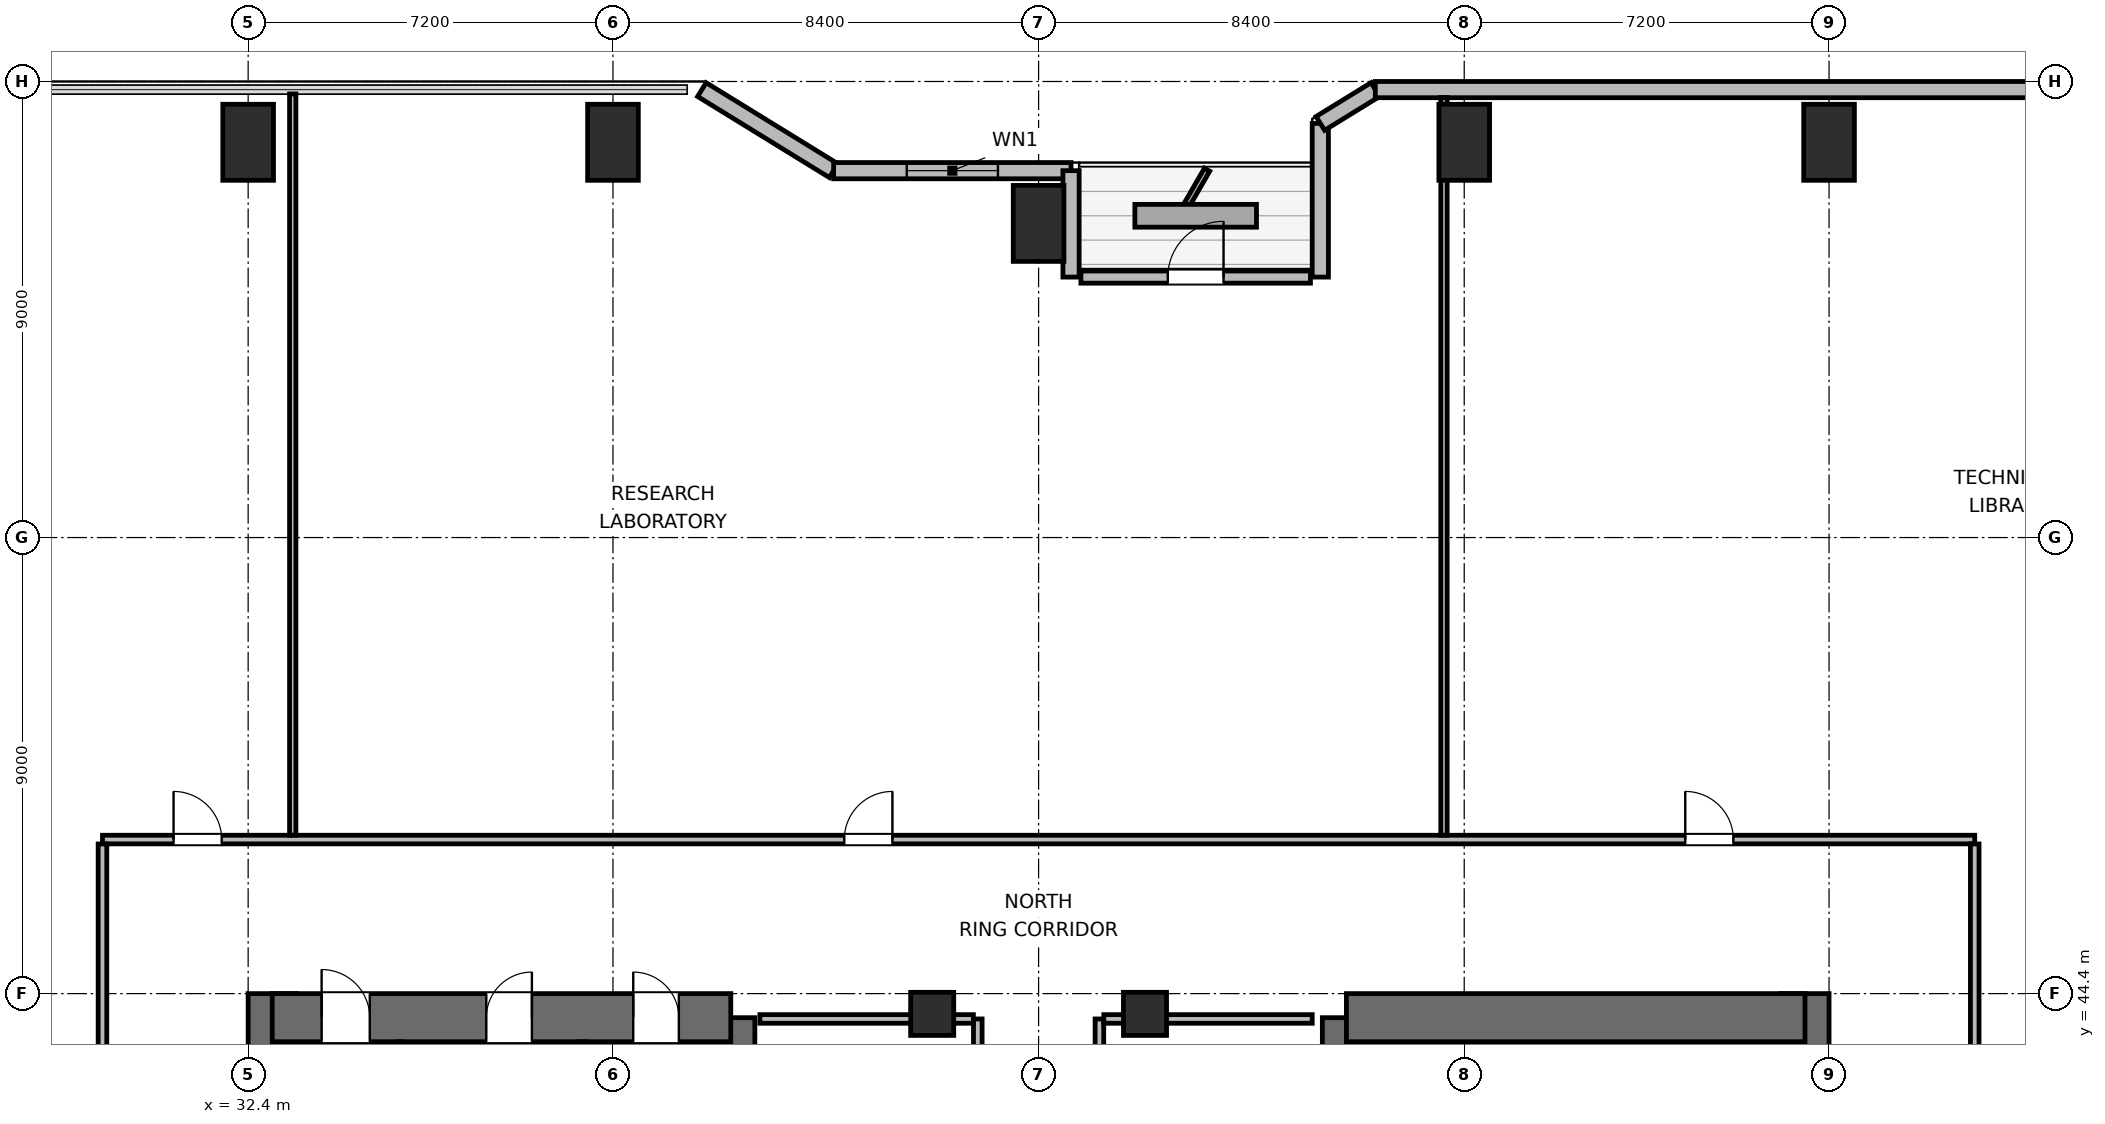
"""IFC4 building model, lengths in metres.
Left out: names, types, materials, properties, quantities, classifications, styles, units other than length and angle.
Written with IfcOpenShell. Run it as: python <this file> out.ifc"""

import sys

from ifc_helpers import new_model, si_unit, direction, frame, frame_2d, origin, origin_2d, place, context, subcontext, project, spatial, rectangle, extrude, element, fill, save


model = new_model("IFC4")
c1 = context("Model", 3, precision=1e-05, world=origin(), true_north=direction((0.0, 1.0)))
c2 = subcontext(c1, "Body", "Model", "MODEL_VIEW")
j1 = project(units=[si_unit("LENGTHUNIT", "METRE"), si_unit("PLANEANGLEUNIT", "RADIAN")], contexts=[c1])
p1 = place(None, origin())
s1 = spatial("IfcSite", under=j1, at=p1, CompositionType="ELEMENT")
p2 = place(p1, origin())
s2 = spatial("IfcBuilding", under=s1, at=p2, CompositionType="ELEMENT")
p3 = place(p2, frame((0.0, 0.0, 76.8)))
s3 = spatial("IfcBuildingStorey", under=s2, at=p3, CompositionType="ELEMENT", Elevation=76.8)
p4 = place(p3, frame((32.875, 27.6, 0.0), z_axis=(0.0, 0.0, 1.0), x_axis=(0.0, 1.0, 0.0)))
e1 = element("IfcWall", 1, at=p4, inside=s3, PredefinedType="SHEAR", context=c2, shape_type="SweptSolid", body=[
    extrude(rectangle(XDim=16.8, YDim=0.95, at=frame_2d((8.4, 0.0))), origin(), (0.0, 0.0, 1.0), 3.9),
])
p5 = place(p3, frame((41.925, 37.8, 0.0), z_axis=(0.0, 0.0, 1.0), x_axis=(0.0, 1.0, 0.0)))
e2 = element("IfcWall", 2, at=p5, inside=s3, PredefinedType="SHEAR", context=c2, shape_type="SweptSolid", body=[
    extrude(rectangle(XDim=6.125, YDim=0.95, at=frame_2d((3.062, 0.0))), origin(), (0.0, 0.0, 1.0), 3.9),
])
p6 = place(p3, frame((32.875, 43.925, 0.0), z_axis=(0.0, 0.0, 1.0), x_axis=(1.0, 0.0, 0.0)))
e3 = element("IfcWall", 3, at=p6, inside=s3, PredefinedType="SHEAR", context=c2, shape_type="SweptSolid", body=[
    extrude(rectangle(XDim=9.05, YDim=0.95, at=frame_2d((4.525, 0.0))), origin(), (0.0, 0.0, 1.0), 3.9),
])
p7 = place(p6, frame((0.975, 0.0, 0.0)))
e4 = element("IfcOpeningElement", 4, at=p7, cuts=e3, PredefinedType="OPENING", context=c2, shape_type="SweptSolid", body=[
    extrude(rectangle(XDim=0.95, YDim=2.04, at=frame_2d((0.475, 1.02))), frame((0.0, 0.485, 0.0), z_axis=(0.0, -1.0, 0.0), x_axis=(1.0, 0.0, 0.0)), (0.0, 0.0, 1.0), 0.97),
])
p8 = place(p6, frame((4.225, 0.0, 0.0)))
e5 = element("IfcOpeningElement", 5, at=p8, cuts=e3, PredefinedType="OPENING", context=c2, shape_type="SweptSolid", body=[
    extrude(rectangle(XDim=0.9, YDim=2.02, at=frame_2d((0.45, 1.01))), frame((0.0, 0.485, 0.0), z_axis=(0.0, -1.0, 0.0), x_axis=(1.0, 0.0, 0.0)), (0.0, 0.0, 1.0), 0.97),
])
p9 = place(p6, frame((7.125, 0.0, 0.0)))
e6 = element("IfcOpeningElement", 6, at=p9, cuts=e3, PredefinedType="OPENING", context=c2, shape_type="SweptSolid", body=[
    extrude(rectangle(XDim=0.9, YDim=2.02, at=frame_2d((0.45, 1.01))), frame((0.0, 0.485, 0.0), z_axis=(0.0, -1.0, 0.0), x_axis=(1.0, 0.0, 0.0)), (0.0, 0.0, 1.0), 0.97),
])
p10 = place(p3, frame((54.075, 38.0, 0.0), z_axis=(0.0, 0.0, 1.0), x_axis=(0.0, 1.0, 0.0)))
e7 = element("IfcWall", 7, at=p10, inside=s3, PredefinedType="SHEAR", context=c2, shape_type="SweptSolid", body=[
    extrude(rectangle(XDim=5.925, YDim=0.95, at=frame_2d((2.962, 0.0))), origin(), (0.0, 0.0, 1.0), 3.9),
])
p11 = place(p3, frame((63.125, 27.6, 0.0), z_axis=(0.0, 0.0, 1.0), x_axis=(0.0, 1.0, 0.0)))
e8 = element("IfcWall", 8, at=p11, inside=s3, PredefinedType="SHEAR", context=c2, shape_type="SweptSolid", body=[
    extrude(rectangle(XDim=16.8, YDim=0.95, at=frame_2d((8.4, 0.0))), origin(), (0.0, 0.0, 1.0), 3.9),
])
p12 = place(p3, frame((54.075, 43.925, 0.0), z_axis=(0.0, 0.0, 1.0), x_axis=(1.0, 0.0, 0.0)))
e9 = element("IfcWall", 9, at=p12, inside=s3, PredefinedType="SHEAR", context=c2, shape_type="SweptSolid", body=[
    extrude(rectangle(XDim=9.05, YDim=0.95, at=frame_2d((4.525, 0.0))), origin(), (0.0, 0.0, 1.0), 3.9),
])
for number, where, z_axis, x_axis in (
    (10, (32.4, 61.2, 0.0), (0.0, 0.0, 1.0), (1.0, 0.0, 0.0)),
    (11, (39.6, 61.2, 0.0), (0.0, 0.0, 1.0), (1.0, 0.0, 0.0)),
    (12, (48.0, 59.6, 0.0), (0.0, 0.0, 1.0), (1.0, 0.0, 0.0)),
    (13, (56.4, 61.2, 0.0), (0.0, 0.0, 1.0), (1.0, 0.0, 0.0)),
    (14, (63.6, 61.2, 0.0), (0.0, 0.0, 1.0), (1.0, 0.0, 0.0)),
):
    element("IfcColumn", number, at=place(p3, frame(where, z_axis=z_axis, x_axis=x_axis)), inside=s3, PredefinedType="COLUMN", context=c2, shape_type="SweptSolid", body=[
        extrude(rectangle(XDim=1.0, YDim=1.5, at=origin_2d()), origin(), (0.0, 0.0, 1.0), 3.9),
    ])
for number, where, z_axis, x_axis in (
    (15, (45.9, 44.0, 0.0), (0.0, 0.0, 1.0), (1.0, 0.0, 0.0)),
    (16, (50.1, 44.0, 0.0), (0.0, 0.0, 1.0), (1.0, 0.0, 0.0)),
):
    element("IfcColumn", number, at=place(p3, frame(where, z_axis=z_axis, x_axis=x_axis)), inside=s3, PredefinedType="COLUMN", context=c2, shape_type="SweptSolid", body=[
        extrude(rectangle(XDim=0.85, YDim=0.85, at=origin_2d()), origin(), (0.0, 0.0, 1.0), 3.9),
    ])
p13 = place(p3, frame((41.355, 62.24, 0.0), z_axis=(0.0, 0.0, 1.0), x_axis=(0.851630857047, -0.524142044989, 0.0)))
e17 = element("IfcWall", 17, at=p13, inside=s3, PredefinedType="SOLIDWALL", context=c2, shape_type="SweptSolid", body=[
    extrude(rectangle(XDim=3.053, YDim=0.32, at=frame_2d((1.526, 0.0))), origin(), (0.0, 0.0, 1.0), 2.185),
])
p14 = place(p3, frame((43.955, 60.64, 0.0), z_axis=(0.0, 0.0, 1.0), x_axis=(1.0, 0.0, 0.0)))
e18 = element("IfcWall", 18, at=p14, inside=s3, PredefinedType="SOLIDWALL", context=c2, shape_type="SweptSolid", body=[
    extrude(rectangle(XDim=4.685, YDim=0.32, at=frame_2d((2.343, 0.0))), origin(), (0.0, 0.0, 1.0), 2.185),
])
p15 = place(p14, frame((1.443, 0.0, 0.85)))
e19 = element("IfcOpeningElement", 19, at=p15, cuts=e18, PredefinedType="OPENING", context=c2, shape_type="SweptSolid", body=[
    extrude(rectangle(XDim=1.8, YDim=1.1, at=frame_2d((0.9, 0.55))), frame((0.0, 0.17, 0.0), z_axis=(0.0, -1.0, 0.0), x_axis=(1.0, 0.0, 0.0)), (0.0, 0.0, 1.0), 0.34),
])
p16 = place(p3, frame((48.64, 60.64, 0.0), z_axis=(0.0, 0.0, 1.0), x_axis=(0.0, -1.0, 0.0)))
e20 = element("IfcWall", 20, at=p16, inside=s3, PredefinedType="SOLIDWALL", context=c2, shape_type="SweptSolid", body=[
    extrude(rectangle(XDim=2.1, YDim=0.32, at=frame_2d((1.05, 0.0))), origin(), (0.0, 0.0, 1.0), 2.185),
])
p17 = place(p3, frame((48.835, 58.54, 0.0), z_axis=(0.0, 0.0, 1.0), x_axis=(1.0, 0.0, 0.0)))
e21 = element("IfcWall", 21, at=p17, inside=s3, PredefinedType="SOLIDWALL", context=c2, shape_type="SweptSolid", body=[
    extrude(rectangle(XDim=4.53, YDim=0.24, at=frame_2d((2.265, 0.0))), origin(), (0.0, 0.0, 1.0), 2.185),
])
p18 = place(p17, frame((1.715, 0.0, 0.0)))
e22 = element("IfcOpeningElement", 22, at=p18, cuts=e21, PredefinedType="OPENING", context=c2, shape_type="SweptSolid", body=[
    extrude(rectangle(XDim=1.1, YDim=2.04, at=frame_2d((0.55, 1.02))), frame((0.0, 0.13, 0.0), z_axis=(0.0, -1.0, 0.0), x_axis=(1.0, 0.0, 0.0)), (0.0, 0.0, 1.0), 0.26),
])
p19 = place(p3, frame((53.56, 58.54, 0.0), z_axis=(0.0, 0.0, 1.0), x_axis=(0.0, 1.0, 0.0)))
e23 = element("IfcWall", 23, at=p19, inside=s3, PredefinedType="SOLIDWALL", context=c2, shape_type="SweptSolid", body=[
    extrude(rectangle(XDim=3.032, YDim=0.32, at=frame_2d((1.516, 0.0))), origin(), (0.0, 0.0, 1.0), 2.185),
])
p20 = place(p3, frame((53.56, 61.573, 0.0), z_axis=(0.0, 0.0, 1.0), x_axis=(0.851776724646, 0.523904964045, 0.0)))
e24 = element("IfcWall", 24, at=p20, inside=s3, PredefinedType="SOLIDWALL", context=c2, shape_type="SweptSolid", body=[
    extrude(rectangle(XDim=1.274, YDim=0.32, at=frame_2d((0.637, 0.0))), origin(), (0.0, 0.0, 1.0), 3.6),
])
p21 = place(p3, frame((54.645, 62.24, 0.0), z_axis=(0.0, 0.0, 1.0), x_axis=(1.0, 0.0, 0.0)))
e25 = element("IfcWall", 25, at=p21, inside=s3, PredefinedType="SOLIDWALL", context=c2, shape_type="SweptSolid", body=[
    extrude(rectangle(XDim=19.134, YDim=0.32, at=frame_2d((9.567, 0.0))), origin(), (0.0, 0.0, 1.0), 3.6),
])
for number, where, z_axis, x_axis in (
    (26, (35.4, 41.095, 0.0), (0.0, 0.0, 1.0), (0.0, 1.0, 0.0)),
    (27, (39.0, 41.095, 0.0), (0.0, 0.0, 1.0), (0.0, 1.0, 0.0)),
):
    element("IfcWall", number, at=place(p3, frame(where, z_axis=z_axis, x_axis=x_axis)), inside=s3, PredefinedType="PARTITIONING", context=c2, shape_type="SweptSolid", body=[
        extrude(rectangle(XDim=2.355, YDim=0.125, at=frame_2d((1.177, 0.0))), origin(), (0.0, 0.0, 1.0), 3.6),
    ])
p22 = place(p3, frame((46.8, 37.9, 0.0), z_axis=(0.0, 0.0, 1.0), x_axis=(0.0, 1.0, 0.0)))
e28 = element("IfcWall", 28, at=p22, inside=s3, PredefinedType="PARTITIONING", context=c2, shape_type="SweptSolid", body=[
    extrude(rectangle(XDim=6.0, YDim=0.17, at=frame_2d((3.0, 0.0))), origin(), (0.0, 0.0, 1.0), 3.6),
])
p23 = place(p22, frame((2.55, 0.0, 0.0)))
e29 = element("IfcOpeningElement", 29, at=p23, cuts=e28, PredefinedType="OPENING", context=c2, shape_type="SweptSolid", body=[
    extrude(rectangle(XDim=0.9, YDim=2.02, at=frame_2d((0.45, 1.01))), frame((0.0, 0.095, 0.0), z_axis=(0.0, -1.0, 0.0), x_axis=(1.0, 0.0, 0.0)), (0.0, 0.0, 1.0), 0.19),
])
p24 = place(p3, frame((42.5, 43.9, 0.0), z_axis=(0.0, 0.0, 1.0), x_axis=(1.0, 0.0, 0.0)))
e30 = element("IfcWall", 30, at=p24, inside=s3, PredefinedType="PARTITIONING", context=c2, shape_type="SweptSolid", body=[
    extrude(rectangle(XDim=4.213, YDim=0.17, at=frame_2d((2.106, 0.0))), origin(), (0.0, 0.0, 1.0), 2.485),
])
p25 = place(p3, frame((49.2, 37.9, 0.0), z_axis=(0.0, 0.0, 1.0), x_axis=(0.0, 1.0, 0.0)))
e31 = element("IfcWall", 31, at=p25, inside=s3, PredefinedType="PARTITIONING", context=c2, shape_type="SweptSolid", body=[
    extrude(rectangle(XDim=6.0, YDim=0.17, at=frame_2d((3.0, 0.0))), origin(), (0.0, 0.0, 1.0), 3.6),
])
p26 = place(p25, frame((1.47, 0.0, 0.0)))
e32 = element("IfcOpeningElement", 32, at=p26, cuts=e31, PredefinedType="OPENING", context=c2, shape_type="SweptSolid", body=[
    extrude(rectangle(XDim=0.9, YDim=2.02, at=frame_2d((0.45, 1.01))), frame((0.0, 0.095, 0.0), z_axis=(0.0, -1.0, 0.0), x_axis=(1.0, 0.0, 0.0)), (0.0, 0.0, 1.0), 0.19),
])
p27 = place(p25, frame((4.47, 0.0, 0.0)))
e33 = element("IfcOpeningElement", 33, at=p27, cuts=e31, PredefinedType="OPENING", context=c2, shape_type="SweptSolid", body=[
    extrude(rectangle(XDim=0.9, YDim=2.02, at=frame_2d((0.45, 1.01))), frame((0.0, 0.095, 0.0), z_axis=(0.0, -1.0, 0.0), x_axis=(1.0, 0.0, 0.0)), (0.0, 0.0, 1.0), 0.19),
])
p28 = place(p3, frame((49.287, 43.9, 0.0), z_axis=(0.0, 0.0, 1.0), x_axis=(1.0, 0.0, 0.0)))
e34 = element("IfcWall", 34, at=p28, inside=s3, PredefinedType="PARTITIONING", context=c2, shape_type="SweptSolid", body=[
    extrude(rectangle(XDim=4.113, YDim=0.17, at=frame_2d((2.056, 0.0))), origin(), (0.0, 0.0, 1.0), 2.485),
])
p29 = place(p3, frame((29.525, 47.44, 0.0), z_axis=(0.0, 0.0, 1.0), x_axis=(1.0, 0.0, 0.0)))
e35 = element("IfcWall", 35, at=p29, inside=s3, PredefinedType="PARTITIONING", context=c2, shape_type="SweptSolid", body=[
    extrude(rectangle(XDim=36.95, YDim=0.17, at=frame_2d((18.475, 0.0))), origin(), (0.0, 0.0, 1.0), 3.6),
])
p30 = place(p29, frame((1.403, 0.0, 0.0)))
e36 = element("IfcOpeningElement", 36, at=p30, cuts=e35, PredefinedType="OPENING", context=c2, shape_type="SweptSolid", body=[
    extrude(rectangle(XDim=0.95, YDim=2.04, at=frame_2d((0.475, 1.02))), frame((0.0, 0.095, 0.0), z_axis=(0.0, -1.0, 0.0), x_axis=(1.0, 0.0, 0.0)), (0.0, 0.0, 1.0), 0.19),
])
p31 = place(p29, frame((14.64, 0.0, 0.0)))
e37 = element("IfcOpeningElement", 37, at=p31, cuts=e35, PredefinedType="OPENING", context=c2, shape_type="SweptSolid", body=[
    extrude(rectangle(XDim=0.95, YDim=2.04, at=frame_2d((0.475, 1.02))), frame((0.0, 0.095, 0.0), z_axis=(0.0, -1.0, 0.0), x_axis=(1.0, 0.0, 0.0)), (0.0, 0.0, 1.0), 0.19),
])
p32 = place(p29, frame((31.237, 0.0, 0.0)))
e38 = element("IfcOpeningElement", 38, at=p32, cuts=e35, PredefinedType="OPENING", context=c2, shape_type="SweptSolid", body=[
    extrude(rectangle(XDim=0.95, YDim=2.04, at=frame_2d((0.475, 1.02))), frame((0.0, 0.095, 0.0), z_axis=(0.0, -1.0, 0.0), x_axis=(1.0, 0.0, 0.0)), (0.0, 0.0, 1.0), 0.19),
])
p33 = place(p3, frame((29.525, 24.647, 0.0), z_axis=(0.0, 0.0, 1.0), x_axis=(0.0, 1.0, 0.0)))
e39 = element("IfcWall", 39, at=p33, inside=s3, PredefinedType="PARTITIONING", context=c2, shape_type="SweptSolid", body=[
    extrude(rectangle(XDim=22.706, YDim=0.17, at=frame_2d((11.353, 0.0))), origin(), (0.0, 0.0, 1.0), 3.6),
])
p34 = place(p33, frame((4.758, 0.0, 0.0)))
e40 = element("IfcOpeningElement", 40, at=p34, cuts=e39, PredefinedType="OPENING", context=c2, shape_type="SweptSolid", body=[
    extrude(rectangle(XDim=0.95, YDim=2.04, at=frame_2d((0.475, 1.02))), frame((0.0, 0.095, 0.0), z_axis=(0.0, -1.0, 0.0), x_axis=(1.0, 0.0, 0.0)), (0.0, 0.0, 1.0), 0.19),
])
p35 = place(p33, frame((16.198, 0.0, 0.0)))
e41 = element("IfcOpeningElement", 41, at=p35, cuts=e39, PredefinedType="OPENING", context=c2, shape_type="SweptSolid", body=[
    extrude(rectangle(XDim=0.95, YDim=2.04, at=frame_2d((0.475, 1.02))), frame((0.0, 0.095, 0.0), z_axis=(0.0, -1.0, 0.0), x_axis=(1.0, 0.0, 0.0)), (0.0, 0.0, 1.0), 0.19),
])
p36 = place(p3, frame((66.475, 24.647, 0.0), z_axis=(0.0, 0.0, 1.0), x_axis=(0.0, 1.0, 0.0)))
e42 = element("IfcWall", 42, at=p36, inside=s3, PredefinedType="PARTITIONING", context=c2, shape_type="SweptSolid", body=[
    extrude(rectangle(XDim=22.706, YDim=0.17, at=frame_2d((11.353, 0.0))), origin(), (0.0, 0.0, 1.0), 3.6),
])
p37 = place(p36, frame((4.658, 0.0, 0.0)))
e43 = element("IfcOpeningElement", 43, at=p37, cuts=e42, PredefinedType="OPENING", context=c2, shape_type="SweptSolid", body=[
    extrude(rectangle(XDim=0.95, YDim=2.04, at=frame_2d((0.475, 1.02))), frame((0.0, 0.095, 0.0), z_axis=(0.0, -1.0, 0.0), x_axis=(1.0, 0.0, 0.0)), (0.0, 0.0, 1.0), 0.19),
])
p38 = place(p36, frame((16.098, 0.0, 0.0)))
e44 = element("IfcOpeningElement", 44, at=p38, cuts=e42, PredefinedType="OPENING", context=c2, shape_type="SweptSolid", body=[
    extrude(rectangle(XDim=0.95, YDim=2.04, at=frame_2d((0.475, 1.02))), frame((0.0, 0.095, 0.0), z_axis=(0.0, -1.0, 0.0), x_axis=(1.0, 0.0, 0.0)), (0.0, 0.0, 1.0), 0.19),
])
p39 = place(p3, frame((33.28, 47.527, 0.0), z_axis=(0.0, 0.0, 1.0), x_axis=(0.0, 1.0, 0.0)))
e45 = element("IfcWall", 45, at=p39, inside=s3, PredefinedType="PARTITIONING", context=c2, shape_type="SweptSolid", body=[
    extrude(rectangle(XDim=14.628, YDim=0.125, at=frame_2d((7.314, 0.0))), origin(), (0.0, 0.0, 1.0), 3.6),
])
p40 = place(p3, frame((56.0, 47.527, 0.0), z_axis=(0.0, 0.0, 1.0), x_axis=(0.0, 1.0, 0.0)))
e46 = element("IfcWall", 46, at=p40, inside=s3, PredefinedType="PARTITIONING", context=c2, shape_type="SweptSolid", body=[
    extrude(rectangle(XDim=14.558, YDim=0.125, at=frame_2d((7.279, 0.0))), origin(), (0.0, 0.0, 1.0), 2.185),
])
p41 = place(p15, origin())
e47 = element("IfcWindow", 47, at=p41, inside=s3, PartitioningType="SINGLE_PANEL", PredefinedType="WINDOW", context=c2, shape_type="SweptSolid", body=[
    extrude(rectangle(XDim=1.8, YDim=1.1, at=frame_2d((0.9, 0.55))), frame((0.0, 0.03, 0.0), z_axis=(0.0, -1.0, 0.0), x_axis=(1.0, 0.0, 0.0)), (0.0, 0.0, 1.0), 0.06),
])
fill(e19, e47)
p42 = place(p18, origin())
e48 = element("IfcDoor", 48, at=p42, inside=s3, OperationType="SINGLE_SWING_RIGHT", PredefinedType="DOOR", context=c2, shape_type="SweptSolid", body=[
    extrude(rectangle(XDim=1.1, YDim=2.04, at=frame_2d((0.55, 1.02))), frame((0.0, 0.025, 0.0), z_axis=(0.0, -1.0, 0.0), x_axis=(1.0, 0.0, 0.0)), (0.0, 0.0, 1.0), 0.05),
])
fill(e22, e48)
p43 = place(p7, origin())
e49 = element("IfcDoor", 49, at=p43, inside=s3, OperationType="SINGLE_SWING_LEFT", PredefinedType="DOOR", context=c2, shape_type="SweptSolid", body=[
    extrude(rectangle(XDim=0.95, YDim=2.04, at=frame_2d((0.475, 1.02))), frame((0.0, 0.025, 0.0), z_axis=(0.0, -1.0, 0.0), x_axis=(1.0, 0.0, 0.0)), (0.0, 0.0, 1.0), 0.05),
])
fill(e4, e49)
p44 = place(p8, origin())
e50 = element("IfcDoor", 50, at=p44, inside=s3, OperationType="SINGLE_SWING_RIGHT", PredefinedType="DOOR", context=c2, shape_type="SweptSolid", body=[
    extrude(rectangle(XDim=0.9, YDim=2.02, at=frame_2d((0.45, 1.01))), frame((0.0, 0.025, 0.0), z_axis=(0.0, -1.0, 0.0), x_axis=(1.0, 0.0, 0.0)), (0.0, 0.0, 1.0), 0.05),
])
fill(e5, e50)
p45 = place(p9, origin())
e51 = element("IfcDoor", 51, at=p45, inside=s3, OperationType="SINGLE_SWING_LEFT", PredefinedType="DOOR", context=c2, shape_type="SweptSolid", body=[
    extrude(rectangle(XDim=0.9, YDim=2.02, at=frame_2d((0.45, 1.01))), frame((0.0, 0.025, 0.0), z_axis=(0.0, -1.0, 0.0), x_axis=(1.0, 0.0, 0.0)), (0.0, 0.0, 1.0), 0.05),
])
fill(e6, e51)
p46 = place(p30, origin())
e52 = element("IfcDoor", 52, at=p46, inside=s3, OperationType="SINGLE_SWING_LEFT", PredefinedType="DOOR", context=c2, shape_type="SweptSolid", body=[
    extrude(rectangle(XDim=0.95, YDim=2.04, at=frame_2d((0.475, 1.02))), frame((0.0, 0.025, 0.0), z_axis=(0.0, -1.0, 0.0), x_axis=(1.0, 0.0, 0.0)), (0.0, 0.0, 1.0), 0.05),
])
fill(e36, e52)
p47 = place(p31, origin())
e53 = element("IfcDoor", 53, at=p47, inside=s3, OperationType="SINGLE_SWING_RIGHT", PredefinedType="DOOR", context=c2, shape_type="SweptSolid", body=[
    extrude(rectangle(XDim=0.95, YDim=2.04, at=frame_2d((0.475, 1.02))), frame((0.0, 0.025, 0.0), z_axis=(0.0, -1.0, 0.0), x_axis=(1.0, 0.0, 0.0)), (0.0, 0.0, 1.0), 0.05),
])
fill(e37, e53)
p48 = place(p32, origin())
e54 = element("IfcDoor", 54, at=p48, inside=s3, OperationType="SINGLE_SWING_LEFT", PredefinedType="DOOR", context=c2, shape_type="SweptSolid", body=[
    extrude(rectangle(XDim=0.95, YDim=2.04, at=frame_2d((0.475, 1.02))), frame((0.0, 0.025, 0.0), z_axis=(0.0, -1.0, 0.0), x_axis=(1.0, 0.0, 0.0)), (0.0, 0.0, 1.0), 0.05),
])
fill(e38, e54)
save(model, sys.argv[1])
